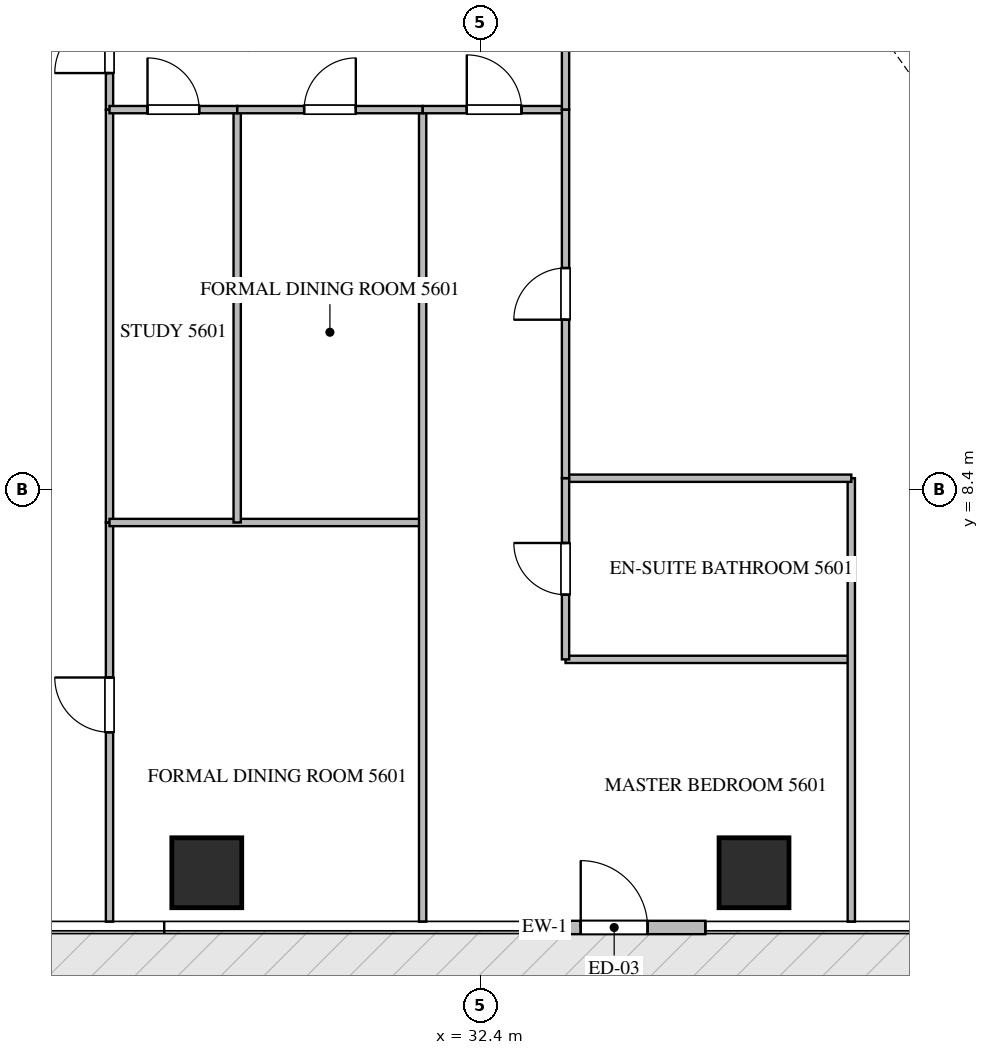
"""IFC4 building model, lengths in metres.
Left out: names, types, materials, properties, quantities, classifications, styles, units other than length and angle.
Written with IfcOpenShell. Run it as: python <this file> out.ifc"""

import sys

from ifc_helpers import new_model, si_unit, direction, frame, frame_2d, origin, origin_2d, place, context, subcontext, project, spatial, rectangle, extrude, source, transform, mapped, element, fill, save


model = new_model("IFC4")
c1 = context("Model", 3, precision=1e-05, world=origin(), true_north=direction((0.0, 1.0)))
c2 = subcontext(c1, "Body", "Model", "MODEL_VIEW")
j1 = project(units=[si_unit("LENGTHUNIT", "METRE"), si_unit("PLANEANGLEUNIT", "RADIAN")], contexts=[c1])
p1 = place(None, origin())
s1 = spatial("IfcSite", under=j1, at=p1, CompositionType="ELEMENT")
p2 = place(p1, origin())
s2 = spatial("IfcBuilding", under=s1, at=p2, CompositionType="ELEMENT")
p3 = place(p2, frame((0.0, 0.0, 225.85)))
s3 = spatial("IfcBuildingStorey", under=s2, at=p3, CompositionType="ELEMENT", Elevation=225.85)
m1 = source(origin(), c2, "Body", "SweptSolid", [
    extrude(rectangle(XDim=1.15, YDim=1.15, at=origin_2d()), origin(), (0.0, 0.0, 1.0), 3.85),
])
for number, where, z_axis, x_axis in (
    (1, (27.9, 2.1, -0.26), (0.0, 0.0, 1.0), (1.0, 0.0, 0.0)),
    (2, (36.9, 2.1, -0.26), (0.0, 0.0, 1.0), (1.0, 0.0, 0.0)),
):
    element("IfcColumn", number, at=place(p3, frame(where, z_axis=z_axis, x_axis=x_axis)), inside=s3, PredefinedType="COLUMN", context=c2, shape_type="MappedRepresentation", body=[
        mapped(m1, transform((0.0, 0.0, 0.0), scale=1.0)),
    ])
p4 = place(p3, frame((33.1, 1.2, 0.0), z_axis=(0.0, 0.0, 1.0), x_axis=(1.0, 0.0, 0.0)))
e3 = element("IfcWall", 3, at=p4, inside=s3, PredefinedType="ELEMENTEDWALL", context=c2, shape_type="SweptSolid", body=[
    extrude(rectangle(XDim=3.0, YDim=0.22, at=frame_2d((1.5, 0.0))), origin(), (0.0, 0.0, 1.0), 3.575),
])
p5 = place(p4, frame((0.95, 0.0, 0.0)))
e4 = element("IfcOpeningElement", 4, at=p5, cuts=e3, PredefinedType="OPENING", context=c2, shape_type="SweptSolid", body=[
    extrude(rectangle(XDim=1.1, YDim=2.2, at=frame_2d((0.55, 1.1))), frame((0.0, 0.12, 0.0), z_axis=(0.0, -1.0, 0.0), x_axis=(1.0, 0.0, 0.0)), (0.0, 0.0, 1.0), 0.24),
])
p6 = place(p3, frame((26.3, 14.65, 0.0), z_axis=(0.0, 0.0, 1.0), x_axis=(0.0, 1.0, 0.0)))
e5 = element("IfcWall", 5, at=p6, inside=s3, PredefinedType="PARTITIONING", context=c2, shape_type="SweptSolid", body=[
    extrude(rectangle(XDim=1.975, YDim=0.12, at=frame_2d((0.988, 0.0))), origin(), (0.0, 0.0, 1.0), 3.59),
])
p7 = place(p6, frame((0.601, 0.0, 0.0)))
e6 = element("IfcOpeningElement", 6, at=p7, cuts=e5, PredefinedType="OPENING", context=c2, shape_type="SweptSolid", body=[
    extrude(rectangle(XDim=0.9, YDim=2.1, at=frame_2d((0.45, 1.05))), frame((0.0, 0.07, 0.0), z_axis=(0.0, -1.0, 0.0), x_axis=(1.0, 0.0, 0.0)), (0.0, 0.0, 1.0), 0.14),
])
p8 = place(p3, frame((26.3, 1.295, 0.0), z_axis=(0.0, 0.0, 1.0), x_axis=(0.0, 1.0, 0.0)))
e7 = element("IfcWall", 7, at=p8, inside=s3, PredefinedType="PARTITIONING", context=c2, shape_type="SweptSolid", body=[
    extrude(rectangle(XDim=6.565, YDim=0.12, at=frame_2d((3.283, 0.0))), origin(), (0.0, 0.0, 1.0), 3.59),
])
p9 = place(p8, frame((3.116, 0.0, 0.0)))
e8 = element("IfcOpeningElement", 8, at=p9, cuts=e7, PredefinedType="OPENING", context=c2, shape_type="SweptSolid", body=[
    extrude(rectangle(XDim=0.9, YDim=2.1, at=frame_2d((0.45, 1.05))), frame((0.0, 0.07, 0.0), z_axis=(0.0, -1.0, 0.0), x_axis=(1.0, 0.0, 0.0)), (0.0, 0.0, 1.0), 0.14),
])
p10 = place(p3, frame((26.3, 7.862, 0.0), z_axis=(0.0, 0.0, 1.0), x_axis=(0.0, 1.0, 0.0)))
e9 = element("IfcWall", 9, at=p10, inside=s3, PredefinedType="PARTITIONING", context=c2, shape_type="SweptSolid", body=[
    extrude(rectangle(XDim=6.786, YDim=0.12, at=frame_2d((3.393, 0.0))), origin(), (0.0, 0.0, 1.0), 3.59),
])
p11 = place(p3, frame((26.3, 7.86, 0.0), z_axis=(0.0, 0.0, 1.0), x_axis=(1.0, 0.0, 0.0)))
e10 = element("IfcWall", 10, at=p11, inside=s3, PredefinedType="PARTITIONING", context=c2, shape_type="SweptSolid", body=[
    extrude(rectangle(XDim=5.15, YDim=0.12, at=frame_2d((2.575, 0.0))), origin(), (0.0, 0.0, 1.0), 3.59),
])
p12 = place(p3, frame((31.45, 1.295, 0.0), z_axis=(0.0, 0.0, 1.0), x_axis=(0.0, 1.0, 0.0)))
e11 = element("IfcWall", 11, at=p12, inside=s3, PredefinedType="PARTITIONING", context=c2, shape_type="SweptSolid", body=[
    extrude(rectangle(XDim=13.355, YDim=0.12, at=frame_2d((6.677, 0.0))), origin(), (0.0, 0.0, 1.0), 3.59),
])
p13 = place(p3, frame((28.4, 7.86, 0.0), z_axis=(0.0, 0.0, 1.0), x_axis=(0.0, 1.0, 0.0)))
e12 = element("IfcWall", 12, at=p13, inside=s3, PredefinedType="PARTITIONING", context=c2, shape_type="SweptSolid", body=[
    extrude(rectangle(XDim=6.79, YDim=0.12, at=frame_2d((3.395, 0.0))), origin(), (0.0, 0.0, 1.0), 3.59),
])
p14 = place(p3, frame((26.3, 14.65, 0.0), z_axis=(0.0, 0.0, 1.0), x_axis=(1.0, 0.0, 0.0)))
e13 = element("IfcWall", 13, at=p14, inside=s3, PredefinedType="PARTITIONING", context=c2, shape_type="SweptSolid", body=[
    extrude(rectangle(XDim=2.1, YDim=0.12, at=frame_2d((1.05, 0.0))), origin(), (0.0, 0.0, 1.0), 3.59),
])
p15 = place(p14, frame((0.625, 0.0, 0.0)))
e14 = element("IfcOpeningElement", 14, at=p15, cuts=e13, PredefinedType="OPENING", context=c2, shape_type="SweptSolid", body=[
    extrude(rectangle(XDim=0.85, YDim=2.1, at=frame_2d((0.425, 1.05))), frame((0.0, 0.07, 0.0), z_axis=(0.0, -1.0, 0.0), x_axis=(1.0, 0.0, 0.0)), (0.0, 0.0, 1.0), 0.14),
])
p16 = place(p3, frame((28.402, 14.65, 0.0), z_axis=(0.0, 0.0, 1.0), x_axis=(1.0, 0.0, 0.0)))
e15 = element("IfcWall", 15, at=p16, inside=s3, PredefinedType="PARTITIONING", context=c2, shape_type="SweptSolid", body=[
    extrude(rectangle(XDim=3.048, YDim=0.12, at=frame_2d((1.524, 0.0))), origin(), (0.0, 0.0, 1.0), 3.59),
])
p17 = place(p16, frame((1.099, 0.0, 0.0)))
e16 = element("IfcOpeningElement", 16, at=p17, cuts=e15, PredefinedType="OPENING", context=c2, shape_type="SweptSolid", body=[
    extrude(rectangle(XDim=0.85, YDim=2.1, at=frame_2d((0.425, 1.05))), frame((0.0, 0.07, 0.0), z_axis=(0.0, -1.0, 0.0), x_axis=(1.0, 0.0, 0.0)), (0.0, 0.0, 1.0), 0.14),
])
p18 = place(p3, frame((31.452, 14.65, 0.0), z_axis=(0.0, 0.0, 1.0), x_axis=(1.0, 0.0, 0.0)))
e17 = element("IfcWall", 17, at=p18, inside=s3, PredefinedType="PARTITIONING", context=c2, shape_type="SweptSolid", body=[
    extrude(rectangle(XDim=2.348, YDim=0.12, at=frame_2d((1.174, 0.0))), origin(), (0.0, 0.0, 1.0), 3.59),
])
p19 = place(p18, frame((0.724, 0.0, 0.0)))
e18 = element("IfcOpeningElement", 18, at=p19, cuts=e17, PredefinedType="OPENING", context=c2, shape_type="SweptSolid", body=[
    extrude(rectangle(XDim=0.9, YDim=2.1, at=frame_2d((0.45, 1.05))), frame((0.0, 0.07, 0.0), z_axis=(0.0, -1.0, 0.0), x_axis=(1.0, 0.0, 0.0)), (0.0, 0.0, 1.0), 0.14),
])
p20 = place(p3, frame((33.8, 5.609, 0.0), z_axis=(0.0, 0.0, 1.0), x_axis=(1.0, 0.0, 0.0)))
e19 = element("IfcWall", 19, at=p20, inside=s3, PredefinedType="PARTITIONING", context=c2, shape_type="SweptSolid", body=[
    extrude(rectangle(XDim=4.7, YDim=0.12, at=frame_2d((2.35, 0.0))), origin(), (0.0, 0.0, 1.0), 3.59),
])
p21 = place(p3, frame((38.5, 1.295, 0.0), z_axis=(0.0, 0.0, 1.0), x_axis=(0.0, 1.0, 0.0)))
e20 = element("IfcWall", 20, at=p21, inside=s3, PredefinedType="PARTITIONING", context=c2, shape_type="SweptSolid", body=[
    extrude(rectangle(XDim=7.293, YDim=0.12, at=frame_2d((3.646, 0.0))), origin(), (0.0, 0.0, 1.0), 3.59),
])
p22 = place(p3, frame((33.8, 8.588, 0.0), z_axis=(0.0, 0.0, 1.0), x_axis=(1.0, 0.0, 0.0)))
e21 = element("IfcWall", 21, at=p22, inside=s3, PredefinedType="PARTITIONING", context=c2, shape_type="SweptSolid", body=[
    extrude(rectangle(XDim=4.7, YDim=0.12, at=frame_2d((2.35, 0.0))), origin(), (0.0, 0.0, 1.0), 3.59),
])
p23 = place(p3, frame((33.8, 5.609, 0.0), z_axis=(0.0, 0.0, 1.0), x_axis=(0.0, 1.0, 0.0)))
e22 = element("IfcWall", 22, at=p23, inside=s3, PredefinedType="PARTITIONING", context=c2, shape_type="SweptSolid", body=[
    extrude(rectangle(XDim=2.979, YDim=0.12, at=frame_2d((1.49, 0.0))), origin(), (0.0, 0.0, 1.0), 3.59),
])
p24 = place(p23, frame((1.064, 0.0, 0.0)))
e23 = element("IfcOpeningElement", 23, at=p24, cuts=e22, PredefinedType="OPENING", context=c2, shape_type="SweptSolid", body=[
    extrude(rectangle(XDim=0.85, YDim=2.1, at=frame_2d((0.425, 1.05))), frame((0.0, 0.07, 0.0), z_axis=(0.0, -1.0, 0.0), x_axis=(1.0, 0.0, 0.0)), (0.0, 0.0, 1.0), 0.14),
])
p25 = place(p3, frame((33.8, 8.59, 0.0), z_axis=(0.0, 0.0, 1.0), x_axis=(0.0, 1.0, 0.0)))
e24 = element("IfcWall", 24, at=p25, inside=s3, PredefinedType="PARTITIONING", context=c2, shape_type="SweptSolid", body=[
    extrude(rectangle(XDim=6.06, YDim=0.12, at=frame_2d((3.03, 0.0))), origin(), (0.0, 0.0, 1.0), 3.59),
])
p26 = place(p25, frame((2.605, 0.0, 0.0)))
e25 = element("IfcOpeningElement", 25, at=p26, cuts=e24, PredefinedType="OPENING", context=c2, shape_type="SweptSolid", body=[
    extrude(rectangle(XDim=0.85, YDim=2.1, at=frame_2d((0.425, 1.05))), frame((0.0, 0.07, 0.0), z_axis=(0.0, -1.0, 0.0), x_axis=(1.0, 0.0, 0.0)), (0.0, 0.0, 1.0), 0.14),
])
p27 = place(p3, frame((33.8, 14.652, 0.0), z_axis=(0.0, 0.0, 1.0), x_axis=(0.0, 1.0, 0.0)))
e26 = element("IfcWall", 26, at=p27, inside=s3, PredefinedType="PARTITIONING", context=c2, shape_type="SweptSolid", body=[
    extrude(rectangle(XDim=1.973, YDim=0.12, at=frame_2d((0.986, 0.0))), origin(), (0.0, 0.0, 1.0), 3.59),
])
m2 = source(origin(), c2, "Body", "SweptSolid", [
    extrude(rectangle(XDim=1.1, YDim=2.2, at=frame_2d((0.55, 1.1))), frame((0.0, 0.025, 0.0), z_axis=(0.0, -1.0, 0.0), x_axis=(1.0, 0.0, 0.0)), (0.0, 0.0, 1.0), 0.05),
])
p28 = place(p5, origin())
e27 = element("IfcDoor", 27, at=p28, inside=s3, OperationType="SINGLE_SWING_LEFT", PredefinedType="DOOR", context=c2, shape_type="MappedRepresentation", body=[
    mapped(m2, transform((0.0, 0.0, 0.0), scale=1.0)),
])
fill(e4, e27)
m3 = source(origin(), c2, "Body", "SweptSolid", [
    extrude(rectangle(XDim=0.9, YDim=2.1, at=frame_2d((0.45, 1.05))), frame((0.0, 0.025, 0.0), z_axis=(0.0, -1.0, 0.0), x_axis=(1.0, 0.0, 0.0)), (0.0, 0.0, 1.0), 0.05),
])
p29 = place(p7, origin())
e28 = element("IfcDoor", 28, at=p29, inside=s3, OperationType="SINGLE_SWING_LEFT", PredefinedType="DOOR", context=c2, shape_type="MappedRepresentation", body=[
    mapped(m3, transform((0.0, 0.0, 0.0), scale=1.0)),
])
fill(e6, e28)
p30 = place(p9, origin())
e29 = element("IfcDoor", 29, at=p30, inside=s3, OperationType="SINGLE_SWING_RIGHT", PredefinedType="DOOR", context=c2, shape_type="MappedRepresentation", body=[
    mapped(m3, transform((0.0, 0.0, 0.0), scale=1.0)),
])
fill(e8, e29)
m4 = source(origin(), c2, "Body", "SweptSolid", [
    extrude(rectangle(XDim=0.85, YDim=2.1, at=frame_2d((0.425, 1.05))), frame((0.0, 0.025, 0.0), z_axis=(0.0, -1.0, 0.0), x_axis=(1.0, 0.0, 0.0)), (0.0, 0.0, 1.0), 0.05),
])
p31 = place(p15, origin())
e30 = element("IfcDoor", 30, at=p31, inside=s3, OperationType="SINGLE_SWING_LEFT", PredefinedType="DOOR", context=c2, shape_type="MappedRepresentation", body=[
    mapped(m4, transform((0.0, 0.0, 0.0), scale=1.0)),
])
fill(e14, e30)
p32 = place(p17, origin())
e31 = element("IfcDoor", 31, at=p32, inside=s3, OperationType="SINGLE_SWING_RIGHT", PredefinedType="DOOR", context=c2, shape_type="MappedRepresentation", body=[
    mapped(m4, transform((0.0, 0.0, 0.0), scale=1.0)),
])
fill(e16, e31)
p33 = place(p19, origin())
e32 = element("IfcDoor", 32, at=p33, inside=s3, OperationType="SINGLE_SWING_LEFT", PredefinedType="DOOR", context=c2, shape_type="MappedRepresentation", body=[
    mapped(m3, transform((0.0, 0.0, 0.0), scale=1.0)),
])
fill(e18, e32)
p34 = place(p24, origin())
e33 = element("IfcDoor", 33, at=p34, inside=s3, OperationType="SINGLE_SWING_RIGHT", PredefinedType="DOOR", context=c2, shape_type="MappedRepresentation", body=[
    mapped(m4, transform((0.0, 0.0, 0.0), scale=1.0)),
])
fill(e23, e33)
p35 = place(p26, origin())
e34 = element("IfcDoor", 34, at=p35, inside=s3, OperationType="SINGLE_SWING_LEFT", PredefinedType="DOOR", context=c2, shape_type="MappedRepresentation", body=[
    mapped(m4, transform((0.0, 0.0, 0.0), scale=1.0)),
])
fill(e25, e34)
save(model, sys.argv[1])
